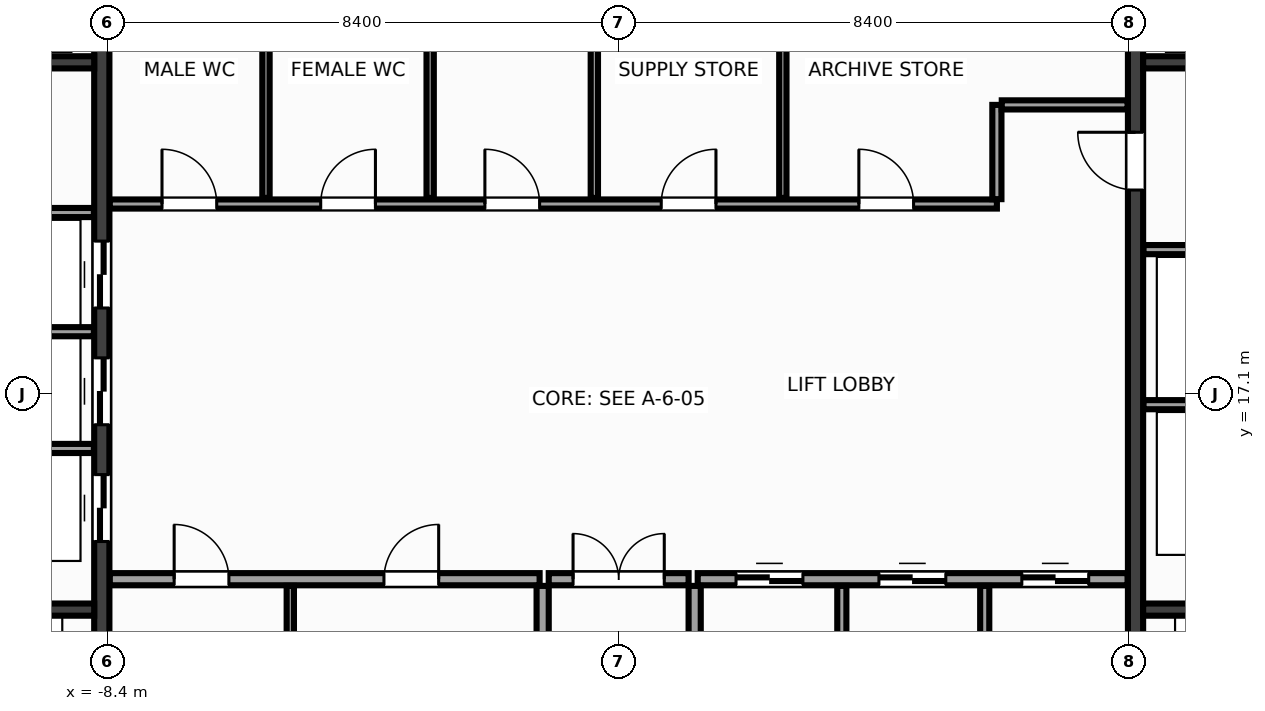
"""IFC4 building model, lengths in metres.
Left out: names, types, materials, properties, quantities, classifications, styles, units other than length and angle.
Written with IfcOpenShell. Run it as: python <this file> out.ifc"""

import sys

from ifc_helpers import new_model, si_unit, direction, frame, frame_2d, origin, place, context, subcontext, project, spatial, rectangle, extrude, source, transform, mapped, element, fill, save


model = new_model("IFC4")
c1 = context("Model", 3, precision=1e-05, world=origin(), true_north=direction((0.0, 1.0)))
c2 = subcontext(c1, "Body", "Model", "MODEL_VIEW")
j1 = project(units=[si_unit("LENGTHUNIT", "METRE"), si_unit("PLANEANGLEUNIT", "RADIAN")], contexts=[c1])
p1 = place(None, origin())
s1 = spatial("IfcSite", under=j1, at=p1, CompositionType="ELEMENT")
p2 = place(p1, origin())
s2 = spatial("IfcBuilding", under=s1, at=p2, CompositionType="ELEMENT")
p3 = place(p2, frame((0.0, 0.0, 178.4)))
s3 = spatial("IfcBuildingStorey", under=s2, at=p3, CompositionType="ELEMENT", Elevation=178.4)
m1 = source(origin(), c2, "Body", "SweptSolid", [
    extrude(rectangle(XDim=12.95, YDim=0.25, at=frame_2d((6.475, 0.0))), origin(), (0.0, 0.0, 1.0), 3.6),
])
p4 = place(p3, frame((-8.5, 10.525, 0.0), z_axis=(0.0, 0.0, 1.0), x_axis=(0.0, 1.0, 0.0)))
e1 = element("IfcWall", 1, at=p4, inside=s3, PredefinedType="SHEAR", context=c2, shape_type="MappedRepresentation", body=[
    mapped(m1, transform((0.0, 0.0, 0.0), x_axis=(1.0, 0.0, 0.0), y_axis=(0.0, 1.0, 0.0), z_axis=(0.0, 0.0, 1.0), scale=1.0)),
])
p5 = place(p4, frame((4.145, 0.0, 0.0)))
e2 = element("IfcOpeningElement", 2, at=p5, cuts=e1, PredefinedType="OPENING", context=c2, shape_type="SweptSolid", body=[
    extrude(rectangle(XDim=1.1, YDim=2.15, at=frame_2d((0.55, 1.075))), frame((0.0, 0.137, 0.0), z_axis=(0.0, -1.0, 0.0), x_axis=(1.0, 0.0, 0.0)), (0.0, 0.0, 1.0), 0.274),
])
p6 = place(p4, frame((6.065, 0.0, 0.0)))
e3 = element("IfcOpeningElement", 3, at=p6, cuts=e1, PredefinedType="OPENING", context=c2, shape_type="SweptSolid", body=[
    extrude(rectangle(XDim=1.1, YDim=2.15, at=frame_2d((0.55, 1.075))), frame((0.0, 0.137, 0.0), z_axis=(0.0, -1.0, 0.0), x_axis=(1.0, 0.0, 0.0)), (0.0, 0.0, 1.0), 0.274),
])
p7 = place(p4, frame((7.985, 0.0, 0.0)))
e4 = element("IfcOpeningElement", 4, at=p7, cuts=e1, PredefinedType="OPENING", context=c2, shape_type="SweptSolid", body=[
    extrude(rectangle(XDim=1.1, YDim=2.15, at=frame_2d((0.55, 1.075))), frame((0.0, 0.137, 0.0), z_axis=(0.0, -1.0, 0.0), x_axis=(1.0, 0.0, 0.0)), (0.0, 0.0, 1.0), 0.274),
])
p8 = place(p3, frame((8.5, 10.525, 0.0), z_axis=(0.0, 0.0, 1.0), x_axis=(0.0, 1.0, 0.0)))
e5 = element("IfcWall", 5, at=p8, inside=s3, PredefinedType="SHEAR", context=c2, shape_type="MappedRepresentation", body=[
    mapped(m1, transform((0.0, 0.0, 0.0), x_axis=(1.0, 0.0, 0.0), y_axis=(0.0, 1.0, 0.0), z_axis=(0.0, 0.0, 1.0), scale=1.0)),
])
p9 = place(p8, frame((9.925, 0.0, 0.0)))
e6 = element("IfcOpeningElement", 6, at=p9, cuts=e5, PredefinedType="OPENING", context=c2, shape_type="SweptSolid", body=[
    extrude(rectangle(XDim=0.95, YDim=2.15, at=frame_2d((0.475, 1.075))), frame((0.0, 0.137, 0.0), z_axis=(0.0, -1.0, 0.0), x_axis=(1.0, 0.0, 0.0)), (0.0, 0.0, 1.0), 0.274),
])
m2 = source(origin(), c2, "Body", "SweptSolid", [
    extrude(rectangle(XDim=2.825, YDim=0.2, at=frame_2d((1.413, 0.0))), origin(), (0.0, 0.0, 1.0), 3.6),
])
for number, where, z_axis, x_axis in (
    (7, (-11.45, 13.55, 0.0), (0.0, 0.0, 1.0), (1.0, 0.0, 0.0)),
    (8, (8.625, 13.55, 0.0), (0.0, 0.0, 1.0), (1.0, 0.0, 0.0)),
):
    element("IfcWall", number, at=place(p3, frame(where, z_axis=z_axis, x_axis=x_axis)), inside=s3, PredefinedType="SHEAR", context=c2, shape_type="MappedRepresentation", body=[
        mapped(m2, transform((0.0, 0.0, 0.0), x_axis=(1.0, 0.0, 0.0), y_axis=(0.0, 1.0, 0.0), z_axis=(0.0, 0.0, 1.0), scale=1.0)),
    ])
m3 = source(origin(), c2, "Body", "SweptSolid", [
    extrude(rectangle(XDim=3.02, YDim=0.2, at=frame_2d((1.51, 0.0))), origin(), (0.0, 0.0, 1.0), 3.6),
])
for number, where, z_axis, x_axis in (
    (9, (-11.645, 22.55, 0.0), (0.0, 0.0, 1.0), (1.0, 0.0, 0.0)),
    (10, (8.625, 22.55, 0.0), (0.0, 0.0, 1.0), (1.0, 0.0, 0.0)),
):
    element("IfcWall", number, at=place(p3, frame(where, z_axis=z_axis, x_axis=x_axis)), inside=s3, PredefinedType="SHEAR", context=c2, shape_type="MappedRepresentation", body=[
        mapped(m3, transform((0.0, 0.0, 0.0), x_axis=(1.0, 0.0, 0.0), y_axis=(0.0, 1.0, 0.0), z_axis=(0.0, 0.0, 1.0), scale=1.0)),
    ])
m4 = source(origin(), c2, "Body", "SweptSolid", [
    extrude(rectangle(XDim=3.01, YDim=0.15, at=frame_2d((1.505, 0.0))), origin(), (0.0, 0.0, 1.0), 3.38),
])
for number, where, z_axis, x_axis in (
    (11, (-11.64, 16.2, 0.0), (0.0, 0.0, 1.0), (1.0, 0.0, 0.0)),
    (12, (-11.64, 18.12, 0.0), (0.0, 0.0, 1.0), (1.0, 0.0, 0.0)),
    (13, (-11.64, 20.08, 0.0), (0.0, 0.0, 1.0), (1.0, 0.0, 0.0)),
    (14, (8.63, 16.92, 0.0), (0.0, 0.0, 1.0), (1.0, 0.0, 0.0)),
    (15, (8.63, 19.47, 0.0), (0.0, 0.0, 1.0), (1.0, 0.0, 0.0)),
):
    element("IfcWall", number, at=place(p3, frame(where, z_axis=z_axis, x_axis=x_axis)), inside=s3, PredefinedType="PARTITIONING", context=c2, shape_type="MappedRepresentation", body=[
        mapped(m4, transform((0.0, 0.0, 0.0), x_axis=(1.0, 0.0, 0.0), y_axis=(0.0, 1.0, 0.0), z_axis=(0.0, 0.0, 1.0), scale=1.0)),
    ])
m5 = source(origin(), c2, "Body", "SweptSolid", [
    extrude(rectangle(XDim=7.07, YDim=0.2, at=frame_2d((3.535, 0.0))), origin(), (0.0, 0.0, 1.0), 3.38),
])
p10 = place(p3, frame((-8.37, 14.05, 0.0), z_axis=(0.0, 0.0, 1.0), x_axis=(1.0, 0.0, 0.0)))
e16 = element("IfcWall", 16, at=p10, inside=s3, PredefinedType="PARTITIONING", context=c2, shape_type="MappedRepresentation", body=[
    mapped(m5, transform((0.0, 0.0, 0.0), x_axis=(1.0, 0.0, 0.0), y_axis=(0.0, 1.0, 0.0), z_axis=(0.0, 0.0, 1.0), scale=1.0)),
])
p11 = place(p10, frame((1.06, 0.0, 0.0)))
e17 = element("IfcOpeningElement", 17, at=p11, cuts=e16, PredefinedType="OPENING", context=c2, shape_type="SweptSolid", body=[
    extrude(rectangle(XDim=0.9, YDim=2.15, at=frame_2d((0.45, 1.075))), frame((0.0, 0.112, 0.0), z_axis=(0.0, -1.0, 0.0), x_axis=(1.0, 0.0, 0.0)), (0.0, 0.0, 1.0), 0.224),
])
p12 = place(p10, frame((4.51, 0.0, 0.0)))
e18 = element("IfcOpeningElement", 18, at=p12, cuts=e16, PredefinedType="OPENING", context=c2, shape_type="SweptSolid", body=[
    extrude(rectangle(XDim=0.9, YDim=2.15, at=frame_2d((0.45, 1.075))), frame((0.0, 0.112, 0.0), z_axis=(0.0, -1.0, 0.0), x_axis=(1.0, 0.0, 0.0)), (0.0, 0.0, 1.0), 0.224),
])
p13 = place(p3, frame((1.3, 14.05, 0.0), z_axis=(0.0, 0.0, 1.0), x_axis=(1.0, 0.0, 0.0)))
e19 = element("IfcWall", 19, at=p13, inside=s3, PredefinedType="PARTITIONING", context=c2, shape_type="MappedRepresentation", body=[
    mapped(m5, transform((0.0, 0.0, 0.0), x_axis=(1.0, 0.0, 0.0), y_axis=(0.0, 1.0, 0.0), z_axis=(0.0, 0.0, 1.0), scale=1.0)),
])
p14 = place(p13, frame((0.63, 0.0, 0.0)))
e20 = element("IfcOpeningElement", 20, at=p14, cuts=e19, PredefinedType="OPENING", context=c2, shape_type="SweptSolid", body=[
    extrude(rectangle(XDim=1.1, YDim=2.15, at=frame_2d((0.55, 1.075))), frame((0.0, 0.112, 0.0), z_axis=(0.0, -1.0, 0.0), x_axis=(1.0, 0.0, 0.0)), (0.0, 0.0, 1.0), 0.224),
])
p15 = place(p13, frame((2.98, 0.0, 0.0)))
e21 = element("IfcOpeningElement", 21, at=p15, cuts=e19, PredefinedType="OPENING", context=c2, shape_type="SweptSolid", body=[
    extrude(rectangle(XDim=1.1, YDim=2.15, at=frame_2d((0.55, 1.075))), frame((0.0, 0.112, 0.0), z_axis=(0.0, -1.0, 0.0), x_axis=(1.0, 0.0, 0.0)), (0.0, 0.0, 1.0), 0.224),
])
p16 = place(p13, frame((5.33, 0.0, 0.0)))
e22 = element("IfcOpeningElement", 22, at=p16, cuts=e19, PredefinedType="OPENING", context=c2, shape_type="SweptSolid", body=[
    extrude(rectangle(XDim=1.1, YDim=2.15, at=frame_2d((0.55, 1.075))), frame((0.0, 0.112, 0.0), z_axis=(0.0, -1.0, 0.0), x_axis=(1.0, 0.0, 0.0)), (0.0, 0.0, 1.0), 0.224),
])
m6 = source(origin(), c2, "Body", "SweptSolid", [
    extrude(rectangle(XDim=3.415, YDim=0.2, at=frame_2d((1.708, 0.0))), origin(), (0.0, 0.0, 1.0), 3.38),
])
for number, where, z_axis, x_axis in (
    (23, (-1.25, 10.525, 0.0), (0.0, 0.0, 1.0), (0.0, 1.0, 0.0)),
    (24, (1.25, 10.525, 0.0), (0.0, 0.0, 1.0), (0.0, 1.0, 0.0)),
):
    element("IfcWall", number, at=place(p3, frame(where, z_axis=z_axis, x_axis=x_axis)), inside=s3, PredefinedType="PARTITIONING", context=c2, shape_type="MappedRepresentation", body=[
        mapped(m6, transform((0.0, 0.0, 0.0), x_axis=(1.0, 0.0, 0.0), y_axis=(0.0, 1.0, 0.0), z_axis=(0.0, 0.0, 1.0), scale=1.0)),
    ])
m7 = source(origin(), c2, "Body", "SweptSolid", [
    extrude(rectangle(XDim=2.3, YDim=0.2, at=frame_2d((1.15, 0.0))), origin(), (0.0, 0.0, 1.0), 3.38),
])
p17 = place(p3, frame((-1.15, 14.05, 0.0), z_axis=(0.0, 0.0, 1.0), x_axis=(1.0, 0.0, 0.0)))
e25 = element("IfcWall", 25, at=p17, inside=s3, PredefinedType="PARTITIONING", context=c2, shape_type="MappedRepresentation", body=[
    mapped(m7, transform((0.0, 0.0, 0.0), x_axis=(1.0, 0.0, 0.0), y_axis=(0.0, 1.0, 0.0), z_axis=(0.0, 0.0, 1.0), scale=1.0)),
])
p18 = place(p17, frame((0.4, 0.0, 0.0)))
e26 = element("IfcOpeningElement", 26, at=p18, cuts=e25, PredefinedType="OPENING", context=c2, shape_type="SweptSolid", body=[
    extrude(rectangle(XDim=1.5, YDim=2.2, at=frame_2d((0.75, 1.1))), frame((0.0, 0.112, 0.0), z_axis=(0.0, -1.0, 0.0), x_axis=(1.0, 0.0, 0.0)), (0.0, 0.0, 1.0), 0.224),
])
m8 = source(origin(), c2, "Body", "SweptSolid", [
    extrude(rectangle(XDim=14.59, YDim=0.15, at=frame_2d((7.295, 0.0))), origin(), (0.0, 0.0, 1.0), 3.38),
])
p19 = place(p3, frame((-8.37, 20.22, 0.0), z_axis=(0.0, 0.0, 1.0), x_axis=(1.0, 0.0, 0.0)))
e27 = element("IfcWall", 27, at=p19, inside=s3, PredefinedType="PARTITIONING", context=c2, shape_type="MappedRepresentation", body=[
    mapped(m8, transform((0.0, 0.0, 0.0), x_axis=(1.0, 0.0, 0.0), y_axis=(0.0, 1.0, 0.0), z_axis=(0.0, 0.0, 1.0), scale=1.0)),
])
p20 = place(p19, frame((0.86, 0.0, 0.0)))
e28 = element("IfcOpeningElement", 28, at=p20, cuts=e27, PredefinedType="OPENING", context=c2, shape_type="SweptSolid", body=[
    extrude(rectangle(XDim=0.9, YDim=2.15, at=frame_2d((0.45, 1.075))), frame((0.0, 0.087, 0.0), z_axis=(0.0, -1.0, 0.0), x_axis=(1.0, 0.0, 0.0)), (0.0, 0.0, 1.0), 0.174),
])
p21 = place(p19, frame((3.47, 0.0, 0.0)))
e29 = element("IfcOpeningElement", 29, at=p21, cuts=e27, PredefinedType="OPENING", context=c2, shape_type="SweptSolid", body=[
    extrude(rectangle(XDim=0.9, YDim=2.15, at=frame_2d((0.45, 1.075))), frame((0.0, 0.087, 0.0), z_axis=(0.0, -1.0, 0.0), x_axis=(1.0, 0.0, 0.0)), (0.0, 0.0, 1.0), 0.174),
])
p22 = place(p19, frame((6.17, 0.0, 0.0)))
e30 = element("IfcOpeningElement", 30, at=p22, cuts=e27, PredefinedType="OPENING", context=c2, shape_type="SweptSolid", body=[
    extrude(rectangle(XDim=0.9, YDim=2.15, at=frame_2d((0.45, 1.075))), frame((0.0, 0.087, 0.0), z_axis=(0.0, -1.0, 0.0), x_axis=(1.0, 0.0, 0.0)), (0.0, 0.0, 1.0), 0.174),
])
p23 = place(p19, frame((9.07, 0.0, 0.0)))
e31 = element("IfcOpeningElement", 31, at=p23, cuts=e27, PredefinedType="OPENING", context=c2, shape_type="SweptSolid", body=[
    extrude(rectangle(XDim=0.9, YDim=2.15, at=frame_2d((0.45, 1.075))), frame((0.0, 0.087, 0.0), z_axis=(0.0, -1.0, 0.0), x_axis=(1.0, 0.0, 0.0)), (0.0, 0.0, 1.0), 0.174),
])
p24 = place(p19, frame((12.32, 0.0, 0.0)))
e32 = element("IfcOpeningElement", 32, at=p24, cuts=e27, PredefinedType="OPENING", context=c2, shape_type="SweptSolid", body=[
    extrude(rectangle(XDim=0.9, YDim=2.15, at=frame_2d((0.45, 1.075))), frame((0.0, 0.087, 0.0), z_axis=(0.0, -1.0, 0.0), x_axis=(1.0, 0.0, 0.0)), (0.0, 0.0, 1.0), 0.174),
])
m9 = source(origin(), c2, "Body", "SweptSolid", [
    extrude(rectangle(XDim=1.55, YDim=0.15, at=frame_2d((0.775, 0.0))), origin(), (0.0, 0.0, 1.0), 3.38),
])
p25 = place(p3, frame((6.22, 20.3, 0.0), z_axis=(0.0, 0.0, 1.0), x_axis=(0.0, 1.0, 0.0)))
e33 = element("IfcWall", 33, at=p25, inside=s3, PredefinedType="PARTITIONING", context=c2, shape_type="MappedRepresentation", body=[
    mapped(m9, transform((0.0, 0.0, 0.0), x_axis=(1.0, 0.0, 0.0), y_axis=(0.0, 1.0, 0.0), z_axis=(0.0, 0.0, 1.0), scale=1.0)),
])
m10 = source(origin(), c2, "Body", "SweptSolid", [
    extrude(rectangle(XDim=2.07, YDim=0.15, at=frame_2d((1.035, 0.0))), origin(), (0.0, 0.0, 1.0), 3.38),
])
p26 = place(p3, frame((6.3, 21.85, 0.0), z_axis=(0.0, 0.0, 1.0), x_axis=(1.0, 0.0, 0.0)))
e34 = element("IfcWall", 34, at=p26, inside=s3, PredefinedType="PARTITIONING", context=c2, shape_type="MappedRepresentation", body=[
    mapped(m10, transform((0.0, 0.0, 0.0), x_axis=(1.0, 0.0, 0.0), y_axis=(0.0, 1.0, 0.0), z_axis=(0.0, 0.0, 1.0), scale=1.0)),
])
m11 = source(origin(), c2, "Body", "SweptSolid", [
    extrude(rectangle(XDim=3.415, YDim=0.12, at=frame_2d((1.708, 0.0))), origin(), (0.0, 0.0, 1.0), 3.38),
])
p27 = place(p3, frame((-5.4, 10.525, 0.0), z_axis=(0.0, 0.0, 1.0), x_axis=(0.0, 1.0, 0.0)))
e35 = element("IfcWall", 35, at=p27, inside=s3, PredefinedType="PARTITIONING", context=c2, shape_type="MappedRepresentation", body=[
    mapped(m11, transform((0.0, 0.0, 0.0), x_axis=(1.0, 0.0, 0.0), y_axis=(0.0, 1.0, 0.0), z_axis=(0.0, 0.0, 1.0), scale=1.0)),
])
m12 = source(origin(), c2, "Body", "SweptSolid", [
    extrude(rectangle(XDim=3.415, YDim=0.15, at=frame_2d((1.708, 0.0))), origin(), (0.0, 0.0, 1.0), 3.38),
])
for number, where, z_axis, x_axis in (
    (36, (3.67, 10.525, 0.0), (0.0, 0.0, 1.0), (0.0, 1.0, 0.0)),
    (37, (6.02, 10.525, 0.0), (0.0, 0.0, 1.0), (0.0, 1.0, 0.0)),
):
    element("IfcWall", number, at=place(p3, frame(where, z_axis=z_axis, x_axis=x_axis)), inside=s3, PredefinedType="PARTITIONING", context=c2, shape_type="MappedRepresentation", body=[
        mapped(m12, transform((0.0, 0.0, 0.0), x_axis=(1.0, 0.0, 0.0), y_axis=(0.0, 1.0, 0.0), z_axis=(0.0, 0.0, 1.0), scale=1.0)),
    ])
m13 = source(origin(), c2, "Body", "SweptSolid", [
    extrude(rectangle(XDim=3.115, YDim=0.12, at=frame_2d((1.558, 0.0))), origin(), (0.0, 0.0, 1.0), 3.38),
])
for number, where, z_axis, x_axis in (
    (38, (-5.8, 20.32, 0.0), (0.0, 0.0, 1.0), (0.0, 1.0, 0.0)),
    (39, (-3.1, 20.32, 0.0), (0.0, 0.0, 1.0), (0.0, 1.0, 0.0)),
    (40, (-0.4, 20.32, 0.0), (0.0, 0.0, 1.0), (0.0, 1.0, 0.0)),
    (41, (2.7, 20.32, 0.0), (0.0, 0.0, 1.0), (0.0, 1.0, 0.0)),
):
    element("IfcWall", number, at=place(p3, frame(where, z_axis=z_axis, x_axis=x_axis)), inside=s3, PredefinedType="PARTITIONING", context=c2, shape_type="MappedRepresentation", body=[
        mapped(m13, transform((0.0, 0.0, 0.0), x_axis=(1.0, 0.0, 0.0), y_axis=(0.0, 1.0, 0.0), z_axis=(0.0, 0.0, 1.0), scale=1.0)),
    ])
m14 = source(origin(), c2, "Body", "SweptSolid", [
    extrude(rectangle(XDim=1.1, YDim=2.15, at=frame_2d((0.55, 1.075))), frame((0.0, 0.025, 0.0), z_axis=(0.0, -1.0, 0.0), x_axis=(1.0, 0.0, 0.0)), (0.0, 0.0, 1.0), 0.05),
])
p28 = place(p5, origin())
e42 = element("IfcDoor", 42, at=p28, inside=s3, OperationType="DOUBLE_DOOR_SLIDING", PredefinedType="DOOR", context=c2, shape_type="MappedRepresentation", body=[
    mapped(m14, transform((0.0, 0.0, 0.0), x_axis=(1.0, 0.0, 0.0), y_axis=(0.0, 1.0, 0.0), z_axis=(0.0, 0.0, 1.0), scale=1.0)),
])
fill(e2, e42)
p29 = place(p6, origin())
e43 = element("IfcDoor", 43, at=p29, inside=s3, OperationType="DOUBLE_DOOR_SLIDING", PredefinedType="DOOR", context=c2, shape_type="MappedRepresentation", body=[
    mapped(m14, transform((0.0, 0.0, 0.0), x_axis=(1.0, 0.0, 0.0), y_axis=(0.0, 1.0, 0.0), z_axis=(0.0, 0.0, 1.0), scale=1.0)),
])
fill(e3, e43)
p30 = place(p7, origin())
e44 = element("IfcDoor", 44, at=p30, inside=s3, OperationType="DOUBLE_DOOR_SLIDING", PredefinedType="DOOR", context=c2, shape_type="MappedRepresentation", body=[
    mapped(m14, transform((0.0, 0.0, 0.0), x_axis=(1.0, 0.0, 0.0), y_axis=(0.0, 1.0, 0.0), z_axis=(0.0, 0.0, 1.0), scale=1.0)),
])
fill(e4, e44)
m15 = source(origin(), c2, "Body", "SweptSolid", [
    extrude(rectangle(XDim=0.95, YDim=2.15, at=frame_2d((0.475, 1.075))), frame((0.0, 0.025, 0.0), z_axis=(0.0, -1.0, 0.0), x_axis=(1.0, 0.0, 0.0)), (0.0, 0.0, 1.0), 0.05),
])
p31 = place(p9, origin())
e45 = element("IfcDoor", 45, at=p31, inside=s3, OperationType="SINGLE_SWING_RIGHT", PredefinedType="DOOR", context=c2, shape_type="MappedRepresentation", body=[
    mapped(m15, transform((0.0, 0.0, 0.0), x_axis=(1.0, 0.0, 0.0), y_axis=(0.0, 1.0, 0.0), z_axis=(0.0, 0.0, 1.0), scale=1.0)),
])
fill(e6, e45)
m16 = source(origin(), c2, "Body", "SweptSolid", [
    extrude(rectangle(XDim=0.9, YDim=2.15, at=frame_2d((0.45, 1.075))), frame((0.0, 0.025, 0.0), z_axis=(0.0, -1.0, 0.0), x_axis=(1.0, 0.0, 0.0)), (0.0, 0.0, 1.0), 0.05),
])
p32 = place(p11, origin())
e46 = element("IfcDoor", 46, at=p32, inside=s3, OperationType="SINGLE_SWING_LEFT", PredefinedType="DOOR", context=c2, shape_type="MappedRepresentation", body=[
    mapped(m16, transform((0.0, 0.0, 0.0), x_axis=(1.0, 0.0, 0.0), y_axis=(0.0, 1.0, 0.0), z_axis=(0.0, 0.0, 1.0), scale=1.0)),
])
fill(e17, e46)
p33 = place(p12, origin())
e47 = element("IfcDoor", 47, at=p33, inside=s3, OperationType="SINGLE_SWING_RIGHT", PredefinedType="DOOR", context=c2, shape_type="MappedRepresentation", body=[
    mapped(m16, transform((0.0, 0.0, 0.0), x_axis=(1.0, 0.0, 0.0), y_axis=(0.0, 1.0, 0.0), z_axis=(0.0, 0.0, 1.0), scale=1.0)),
])
fill(e18, e47)
p34 = place(p14, origin())
e48 = element("IfcDoor", 48, at=p34, inside=s3, OperationType="DOUBLE_DOOR_SLIDING", PredefinedType="DOOR", context=c2, shape_type="MappedRepresentation", body=[
    mapped(m14, transform((0.0, 0.0, 0.0), x_axis=(1.0, 0.0, 0.0), y_axis=(0.0, 1.0, 0.0), z_axis=(0.0, 0.0, 1.0), scale=1.0)),
])
fill(e20, e48)
p35 = place(p15, origin())
e49 = element("IfcDoor", 49, at=p35, inside=s3, OperationType="DOUBLE_DOOR_SLIDING", PredefinedType="DOOR", context=c2, shape_type="MappedRepresentation", body=[
    mapped(m14, transform((0.0, 0.0, 0.0), x_axis=(1.0, 0.0, 0.0), y_axis=(0.0, 1.0, 0.0), z_axis=(0.0, 0.0, 1.0), scale=1.0)),
])
fill(e21, e49)
p36 = place(p16, origin())
e50 = element("IfcDoor", 50, at=p36, inside=s3, OperationType="DOUBLE_DOOR_SLIDING", PredefinedType="DOOR", context=c2, shape_type="MappedRepresentation", body=[
    mapped(m14, transform((0.0, 0.0, 0.0), x_axis=(1.0, 0.0, 0.0), y_axis=(0.0, 1.0, 0.0), z_axis=(0.0, 0.0, 1.0), scale=1.0)),
])
fill(e22, e50)
m17 = source(origin(), c2, "Body", "SweptSolid", [
    extrude(rectangle(XDim=1.5, YDim=2.2, at=frame_2d((0.75, 1.1))), frame((0.0, 0.025, 0.0), z_axis=(0.0, -1.0, 0.0), x_axis=(1.0, 0.0, 0.0)), (0.0, 0.0, 1.0), 0.05),
])
p37 = place(p18, origin())
e51 = element("IfcDoor", 51, at=p37, inside=s3, OperationType="DOUBLE_DOOR_SINGLE_SWING", PredefinedType="DOOR", context=c2, shape_type="MappedRepresentation", body=[
    mapped(m17, transform((0.0, 0.0, 0.0), x_axis=(1.0, 0.0, 0.0), y_axis=(0.0, 1.0, 0.0), z_axis=(0.0, 0.0, 1.0), scale=1.0)),
])
fill(e26, e51)
p38 = place(p20, origin())
e52 = element("IfcDoor", 52, at=p38, inside=s3, OperationType="SINGLE_SWING_LEFT", PredefinedType="DOOR", context=c2, shape_type="MappedRepresentation", body=[
    mapped(m16, transform((0.0, 0.0, 0.0), x_axis=(1.0, 0.0, 0.0), y_axis=(0.0, 1.0, 0.0), z_axis=(0.0, 0.0, 1.0), scale=1.0)),
])
fill(e28, e52)
p39 = place(p21, origin())
e53 = element("IfcDoor", 53, at=p39, inside=s3, OperationType="SINGLE_SWING_RIGHT", PredefinedType="DOOR", context=c2, shape_type="MappedRepresentation", body=[
    mapped(m16, transform((0.0, 0.0, 0.0), x_axis=(1.0, 0.0, 0.0), y_axis=(0.0, 1.0, 0.0), z_axis=(0.0, 0.0, 1.0), scale=1.0)),
])
fill(e29, e53)
p40 = place(p22, origin())
e54 = element("IfcDoor", 54, at=p40, inside=s3, OperationType="SINGLE_SWING_LEFT", PredefinedType="DOOR", context=c2, shape_type="MappedRepresentation", body=[
    mapped(m16, transform((0.0, 0.0, 0.0), x_axis=(1.0, 0.0, 0.0), y_axis=(0.0, 1.0, 0.0), z_axis=(0.0, 0.0, 1.0), scale=1.0)),
])
fill(e30, e54)
p41 = place(p23, origin())
e55 = element("IfcDoor", 55, at=p41, inside=s3, OperationType="SINGLE_SWING_RIGHT", PredefinedType="DOOR", context=c2, shape_type="MappedRepresentation", body=[
    mapped(m16, transform((0.0, 0.0, 0.0), x_axis=(1.0, 0.0, 0.0), y_axis=(0.0, 1.0, 0.0), z_axis=(0.0, 0.0, 1.0), scale=1.0)),
])
fill(e31, e55)
p42 = place(p24, origin())
e56 = element("IfcDoor", 56, at=p42, inside=s3, OperationType="SINGLE_SWING_LEFT", PredefinedType="DOOR", context=c2, shape_type="MappedRepresentation", body=[
    mapped(m16, transform((0.0, 0.0, 0.0), x_axis=(1.0, 0.0, 0.0), y_axis=(0.0, 1.0, 0.0), z_axis=(0.0, 0.0, 1.0), scale=1.0)),
])
fill(e32, e56)
save(model, sys.argv[1])
